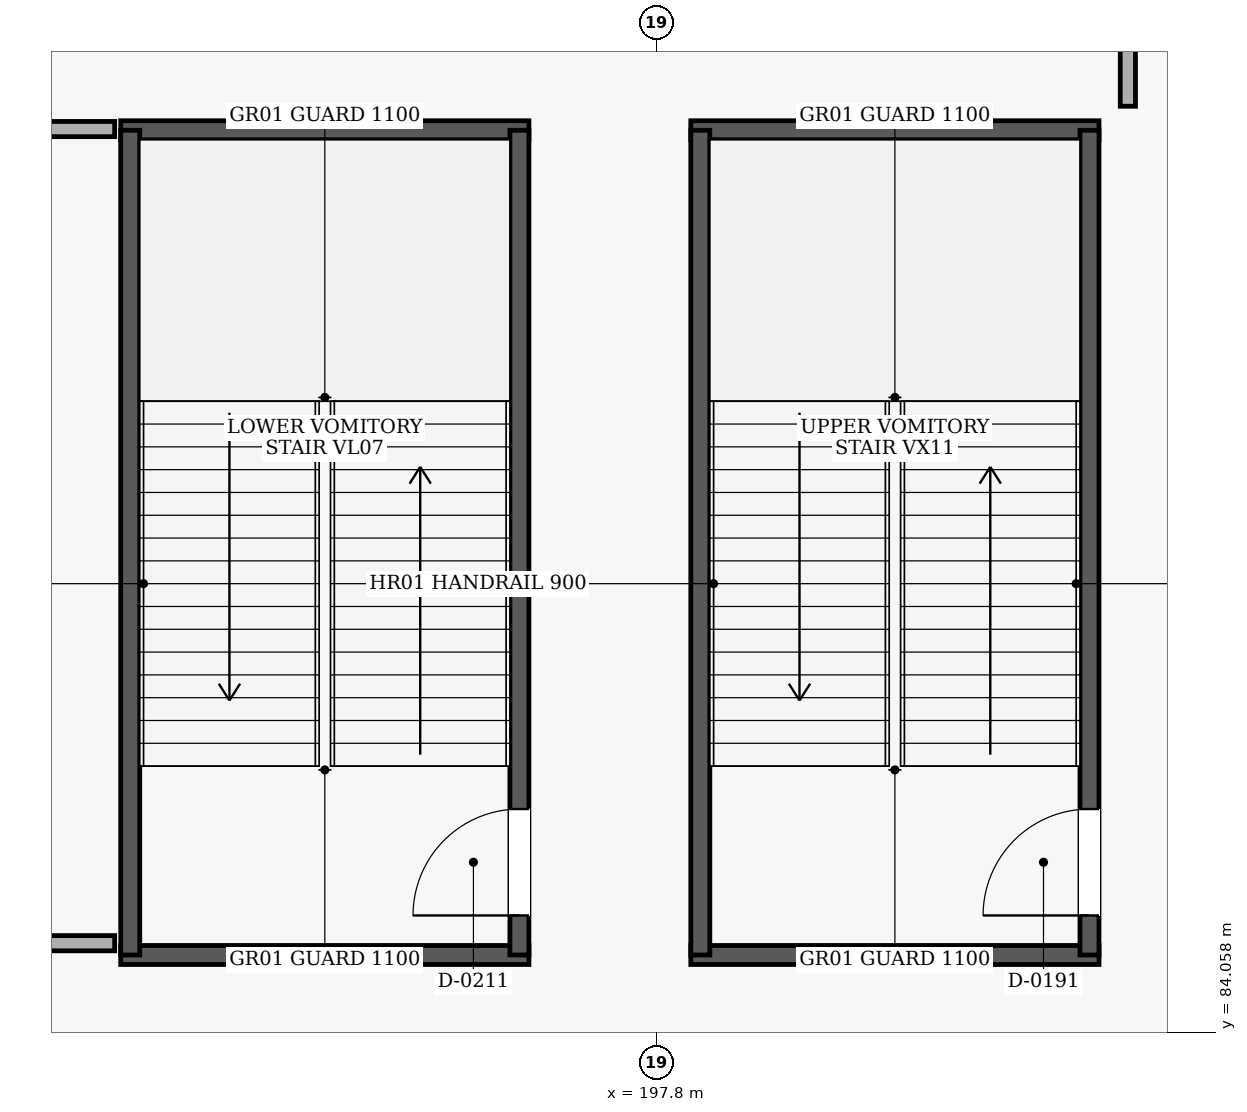
"""IFC4 building model, lengths in metres.
Left out: names, types, materials, properties, quantities, classifications, styles, units other than length and angle.
Written with IfcOpenShell. Run it as: python <this file> out.ifc"""

import sys

from ifc_helpers import new_model, si_unit, direction, frame, frame_2d, origin, place, context, subcontext, project, spatial, rectangle, extrude, element, fill, save


model = new_model("IFC4")
c1 = context("Model", 3, precision=1e-05, world=origin(), true_north=direction((0.0, 1.0)))
c2 = subcontext(c1, "Body", "Model", "MODEL_VIEW")
j1 = project(units=[si_unit("LENGTHUNIT", "METRE"), si_unit("PLANEANGLEUNIT", "RADIAN")], contexts=[c1])
p1 = place(None, origin())
s1 = spatial("IfcSite", under=j1, at=p1, CompositionType="ELEMENT")
p2 = place(p1, origin())
s2 = spatial("IfcBuilding", under=s1, at=p2, CompositionType="ELEMENT")
p3 = place(p2, origin())
s3 = spatial("IfcBuildingStorey", under=s2, at=p3, CompositionType="ELEMENT", Elevation=0.0)
for number, where, z_axis, x_axis in (
    (1, (198.25, 85.075, 0.0), (0.0, 0.0, 1.0), (1.0, 0.0, 0.0)),
    (2, (203.62, 95.925, 0.0), (0.0, 0.0, 1.0), (-1.0, 0.0, 0.0)),
):
    element("IfcWall", number, at=place(p3, frame(where, z_axis=z_axis, x_axis=x_axis)), inside=s3, PredefinedType="SHEAR", context=c2, shape_type="SweptSolid", body=[
        extrude(rectangle(XDim=5.37, YDim=0.25, at=frame_2d((2.685, 0.0))), origin(), (0.0, 0.0, 1.0), 5.08),
    ])
p4 = place(p3, frame((198.375, 85.075, 0.0), z_axis=(0.0, 0.0, 1.0), x_axis=(0.0, 1.0, 0.0)))
e3 = element("IfcWall", 3, at=p4, inside=s3, PredefinedType="SHEAR", context=c2, shape_type="SweptSolid", body=[
    extrude(rectangle(XDim=10.85, YDim=0.25, at=frame_2d((5.425, 0.0))), origin(), (0.0, 0.0, 1.0), 5.08),
])
p5 = place(p3, frame((203.495, 85.075, 0.0), z_axis=(0.0, 0.0, 1.0), x_axis=(0.0, 1.0, 0.0)))
e4 = element("IfcWall", 4, at=p5, inside=s3, PredefinedType="SHEAR", context=c2, shape_type="SweptSolid", body=[
    extrude(rectangle(XDim=10.85, YDim=0.25, at=frame_2d((5.425, 0.0))), origin(), (0.0, 0.0, 1.0), 5.08),
])
p6 = place(p5, frame((0.52, 0.0, 0.0)))
e5 = element("IfcOpeningElement", 5, at=p6, cuts=e4, PredefinedType="OPENING", context=c2, shape_type="SweptSolid", body=[
    extrude(rectangle(XDim=1.4, YDim=2.15, at=frame_2d((0.7, 1.075))), frame((0.0, 0.135, 0.0), z_axis=(0.0, -1.0, 0.0), x_axis=(1.0, 0.0, 0.0)), (0.0, 0.0, 1.0), 0.27),
])
for number, where, z_axis, x_axis in (
    (6, (190.75, 85.075, 0.0), (0.0, 0.0, 1.0), (1.0, 0.0, 0.0)),
    (7, (196.12, 95.925, 0.0), (0.0, 0.0, 1.0), (-1.0, 0.0, 0.0)),
):
    element("IfcWall", number, at=place(p3, frame(where, z_axis=z_axis, x_axis=x_axis)), inside=s3, PredefinedType="SHEAR", context=c2, shape_type="SweptSolid", body=[
        extrude(rectangle(XDim=5.37, YDim=0.25, at=frame_2d((2.685, 0.0))), origin(), (0.0, 0.0, 1.0), 5.08),
    ])
p7 = place(p3, frame((190.875, 85.075, 0.0), z_axis=(0.0, 0.0, 1.0), x_axis=(0.0, 1.0, 0.0)))
e8 = element("IfcWall", 8, at=p7, inside=s3, PredefinedType="SHEAR", context=c2, shape_type="SweptSolid", body=[
    extrude(rectangle(XDim=10.85, YDim=0.25, at=frame_2d((5.425, 0.0))), origin(), (0.0, 0.0, 1.0), 5.08),
])
p8 = place(p3, frame((195.995, 85.075, 0.0), z_axis=(0.0, 0.0, 1.0), x_axis=(0.0, 1.0, 0.0)))
e9 = element("IfcWall", 9, at=p8, inside=s3, PredefinedType="SHEAR", context=c2, shape_type="SweptSolid", body=[
    extrude(rectangle(XDim=10.85, YDim=0.25, at=frame_2d((5.425, 0.0))), origin(), (0.0, 0.0, 1.0), 5.08),
])
p9 = place(p8, frame((0.52, 0.0, 0.0)))
e10 = element("IfcOpeningElement", 10, at=p9, cuts=e9, PredefinedType="OPENING", context=c2, shape_type="SweptSolid", body=[
    extrude(rectangle(XDim=1.4, YDim=2.15, at=frame_2d((0.7, 1.075))), frame((0.0, 0.135, 0.0), z_axis=(0.0, -1.0, 0.0), x_axis=(1.0, 0.0, 0.0)), (0.0, 0.0, 1.0), 0.27),
])
p10 = place(p3, frame((175.6, 85.23, 0.0), z_axis=(0.0, 0.0, 1.0), x_axis=(1.0, 0.0, 0.0)))
e11 = element("IfcWall", 11, at=p10, inside=s3, PredefinedType="PARTITIONING", context=c2, shape_type="SweptSolid", body=[
    extrude(rectangle(XDim=15.07, YDim=0.2, at=frame_2d((7.535, 0.0))), origin(), (0.0, 0.0, 1.0), 5.08),
])
p11 = place(p10, frame((7.989, 0.0, 0.0)))
e12 = element("IfcOpeningElement", 12, at=p11, cuts=e11, PredefinedType="OPENING", context=c2, shape_type="SweptSolid", body=[
    extrude(rectangle(XDim=1.2, YDim=2.15, at=frame_2d((0.6, 1.075))), frame((0.0, 0.11, 0.0), z_axis=(0.0, -1.0, 0.0), x_axis=(1.0, 0.0, 0.0)), (0.0, 0.0, 1.0), 0.22),
])
p12 = place(p3, frame((190.67, 95.941, 0.0), z_axis=(0.0, 0.0, 1.0), x_axis=(-1.0, 0.0, 0.0)))
e13 = element("IfcWall", 13, at=p12, inside=s3, PredefinedType="PARTITIONING", context=c2, shape_type="SweptSolid", body=[
    extrude(rectangle(XDim=15.07, YDim=0.2, at=frame_2d((7.535, 0.0))), origin(), (0.0, 0.0, 1.0), 5.08),
])
p13 = place(p3, frame((204.0, 96.241, 0.0), z_axis=(0.0, 0.0, 1.0), x_axis=(0.0, 1.0, 0.0)))
e14 = element("IfcWall", 14, at=p13, inside=s3, PredefinedType="PARTITIONING", context=c2, shape_type="SweptSolid", body=[
    extrude(rectangle(XDim=3.029, YDim=0.2, at=frame_2d((1.515, 0.0))), origin(), (0.0, 0.0, 1.0), 5.08),
])
p14 = place(p13, frame((0.865, 0.0, 0.0)))
e15 = element("IfcOpeningElement", 15, at=p14, cuts=e14, PredefinedType="OPENING", context=c2, shape_type="SweptSolid", body=[
    extrude(rectangle(XDim=1.3, YDim=2.2, at=frame_2d((0.65, 1.1))), frame((0.0, 0.11, 0.0), z_axis=(0.0, -1.0, 0.0), x_axis=(1.0, 0.0, 0.0)), (0.0, 0.0, 1.0), 0.22),
])
p15 = place(p6, frame((1.4, 0.0, 0.0), z_axis=(0.0, 0.0, 1.0), x_axis=(-1.0, 0.0, 0.0)))
e16 = element("IfcDoor", 16, at=p15, inside=s3, OperationType="SINGLE_SWING_RIGHT", PredefinedType="DOOR", context=c2, shape_type="SweptSolid", body=[
    extrude(rectangle(XDim=1.4, YDim=2.15, at=frame_2d((0.7, 1.075))), frame((0.0, 0.025, 0.0), z_axis=(0.0, -1.0, 0.0), x_axis=(1.0, 0.0, 0.0)), (0.0, 0.0, 1.0), 0.05),
])
fill(e5, e16)
p16 = place(p9, frame((1.4, 0.0, 0.0), z_axis=(0.0, 0.0, 1.0), x_axis=(-1.0, 0.0, 0.0)))
e17 = element("IfcDoor", 17, at=p16, inside=s3, OperationType="SINGLE_SWING_RIGHT", PredefinedType="DOOR", context=c2, shape_type="SweptSolid", body=[
    extrude(rectangle(XDim=1.4, YDim=2.15, at=frame_2d((0.7, 1.075))), frame((0.0, 0.025, 0.0), z_axis=(0.0, -1.0, 0.0), x_axis=(1.0, 0.0, 0.0)), (0.0, 0.0, 1.0), 0.05),
])
fill(e10, e17)
save(model, sys.argv[1])
